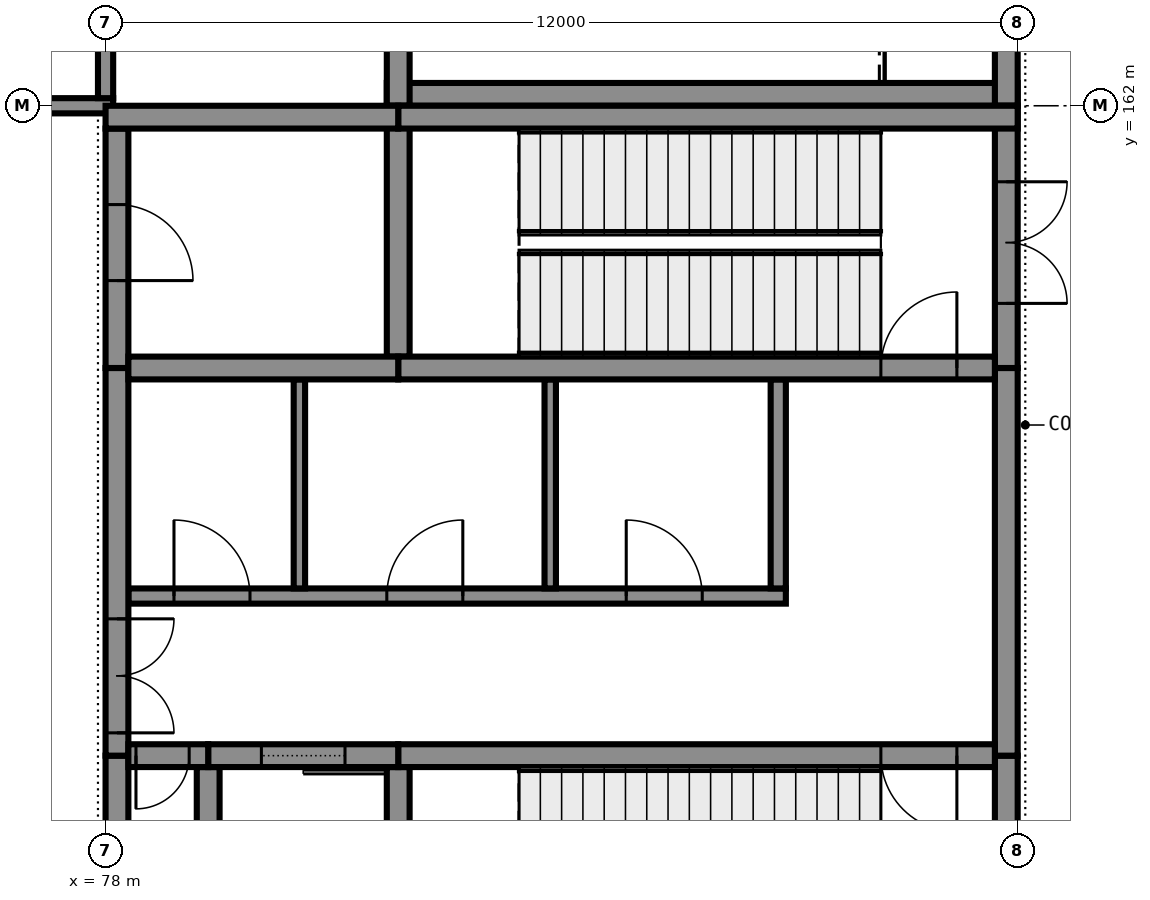
"""IFC4 building model, lengths in metres.
Left out: names, types, materials, properties, quantities, classifications, styles, units other than length and angle.
Written with IfcOpenShell. Run it as: python <this file> out.ifc"""

import sys

from ifc_helpers import new_model, si_unit, direction, frame, frame_2d, origin, place, context, subcontext, project, spatial, rectangle, extrude, element, fill, save


model = new_model("IFC4")
c1 = context("Model", 3, precision=1e-05, world=origin(), true_north=direction((0.0, 1.0)))
c2 = subcontext(c1, "Body", "Model", "MODEL_VIEW")
j1 = project(units=[si_unit("LENGTHUNIT", "METRE"), si_unit("PLANEANGLEUNIT", "RADIAN")], contexts=[c1])
p1 = place(None, origin())
s1 = spatial("IfcSite", under=j1, at=p1, CompositionType="ELEMENT")
p2 = place(p1, origin())
s2 = spatial("IfcBuilding", under=s1, at=p2, CompositionType="ELEMENT")
p3 = place(p2, origin())
s3 = spatial("IfcBuildingStorey", under=s2, at=p3, CompositionType="ELEMENT", Elevation=0.0)
p4 = place(p3, frame((90.0, 162.15, 0.0), z_axis=(0.0, 0.0, 1.0), x_axis=(-1.0, 0.0, 0.0)))
e1 = element("IfcWall", 1, at=p4, inside=s3, PredefinedType="SHEAR", context=c2, shape_type="SweptSolid", body=[
    extrude(rectangle(XDim=8.3, YDim=0.3, at=frame_2d((4.15, 0.0))), origin(), (0.0, 0.0, 1.0), 5.75),
])
p5 = place(p3, frame((89.85, 162.0, 0.0), z_axis=(0.0, 0.0, 1.0), x_axis=(0.0, 1.0, 0.0)))
e2 = element("IfcWall", 2, at=p5, inside=s3, PredefinedType="SHEAR", context=c2, shape_type="SweptSolid", body=[
    extrude(rectangle(XDim=3.3, YDim=0.3, at=frame_2d((1.65, 0.0))), origin(), (0.0, 0.0, 1.0), 5.75),
])
p6 = place(p5, frame((1.0, 0.0, 0.0)))
e3 = element("IfcOpeningElement", 3, at=p6, cuts=e2, PredefinedType="OPENING", context=c2, shape_type="SweptSolid", body=[
    extrude(rectangle(XDim=1.6, YDim=2.1, at=frame_2d((0.8, 1.05))), frame((0.0, 0.16, 0.0), z_axis=(0.0, -1.0, 0.0), x_axis=(1.0, 0.0, 0.0)), (0.0, 0.0, 1.0), 0.32),
])
p7 = place(p3, frame((81.85, 162.0, 0.0), z_axis=(0.0, 0.0, 1.0), x_axis=(0.0, 1.0, 0.0)))
e4 = element("IfcWall", 4, at=p7, inside=s3, PredefinedType="SHEAR", context=c2, shape_type="SweptSolid", body=[
    extrude(rectangle(XDim=3.3, YDim=0.3, at=frame_2d((1.65, 0.0))), origin(), (0.0, 0.0, 1.0), 5.75),
])
p8 = place(p3, frame((90.0, 161.85, 0.0), z_axis=(0.0, 0.0, 1.0), x_axis=(-1.0, 0.0, 0.0)))
e5 = element("IfcWall", 5, at=p8, inside=s3, PredefinedType="SHEAR", context=c2, shape_type="SweptSolid", body=[
    extrude(rectangle(XDim=8.15, YDim=0.3, at=frame_2d((4.075, 0.0))), origin(), (0.0, 0.0, 1.0), 5.75),
])
p9 = place(p3, frame((81.85, 161.85, 0.0), z_axis=(0.0, 0.0, 1.0), x_axis=(-1.0, 0.0, 0.0)))
e6 = element("IfcWall", 6, at=p9, inside=s3, PredefinedType="SHEAR", context=c2, shape_type="SweptSolid", body=[
    extrude(rectangle(XDim=3.85, YDim=0.3, at=frame_2d((1.925, 0.0))), origin(), (0.0, 0.0, 1.0), 5.75),
])
p10 = place(p3, frame((89.7, 153.45, 0.0), z_axis=(0.0, 0.0, 1.0), x_axis=(-1.0, 0.0, 0.0)))
e7 = element("IfcWall", 7, at=p10, inside=s3, PredefinedType="SHEAR", context=c2, shape_type="SweptSolid", body=[
    extrude(rectangle(XDim=7.85, YDim=0.3, at=frame_2d((3.925, 0.0))), origin(), (0.0, 0.0, 1.0), 5.75),
])
p11 = place(p10, frame((0.5, 0.0, 0.0)))
e8 = element("IfcOpeningElement", 8, at=p11, cuts=e7, PredefinedType="OPENING", context=c2, shape_type="SweptSolid", body=[
    extrude(rectangle(XDim=1.0, YDim=2.1, at=frame_2d((0.5, 1.05))), frame((0.0, 0.16, 0.0), z_axis=(0.0, -1.0, 0.0), x_axis=(1.0, 0.0, 0.0)), (0.0, 0.0, 1.0), 0.32),
])
p12 = place(p3, frame((81.85, 153.45, 0.0), z_axis=(0.0, 0.0, 1.0), x_axis=(-1.0, 0.0, 0.0)))
e9 = element("IfcWall", 9, at=p12, inside=s3, PredefinedType="SHEAR", context=c2, shape_type="SweptSolid", body=[
    extrude(rectangle(XDim=2.5, YDim=0.3, at=frame_2d((1.25, 0.0))), origin(), (0.0, 0.0, 1.0), 5.75),
])
p13 = place(p12, frame((0.7, 0.0, 0.0)))
e10 = element("IfcOpeningElement", 10, at=p13, cuts=e9, PredefinedType="OPENING", context=c2, shape_type="SweptSolid", body=[
    extrude(rectangle(XDim=1.1, YDim=2.1, at=frame_2d((0.55, 1.05))), frame((0.0, 0.16, 0.0), z_axis=(0.0, -1.0, 0.0), x_axis=(1.0, 0.0, 0.0)), (0.0, 0.0, 1.0), 0.32),
])
p14 = place(p3, frame((79.35, 153.45, 0.0), z_axis=(0.0, 0.0, 1.0), x_axis=(-1.0, 0.0, 0.0)))
e11 = element("IfcWall", 11, at=p14, inside=s3, PredefinedType="SHEAR", context=c2, shape_type="SweptSolid", body=[
    extrude(rectangle(XDim=1.05, YDim=0.3, at=frame_2d((0.525, 0.0))), origin(), (0.0, 0.0, 1.0), 5.75),
])
p15 = place(p14, frame((0.25, 0.0, 0.0)))
e12 = element("IfcOpeningElement", 12, at=p15, cuts=e11, PredefinedType="OPENING", context=c2, shape_type="SweptSolid", body=[
    extrude(rectangle(XDim=0.7, YDim=2.1, at=frame_2d((0.35, 1.05))), frame((0.0, 0.16, 0.0), z_axis=(0.0, -1.0, 0.0), x_axis=(1.0, 0.0, 0.0)), (0.0, 0.0, 1.0), 0.32),
])
p16 = place(p3, frame((89.7, 158.55, 0.0), z_axis=(0.0, 0.0, 1.0), x_axis=(-1.0, 0.0, 0.0)))
e13 = element("IfcWall", 13, at=p16, inside=s3, PredefinedType="SHEAR", context=c2, shape_type="SweptSolid", body=[
    extrude(rectangle(XDim=7.85, YDim=0.3, at=frame_2d((3.925, 0.0))), origin(), (0.0, 0.0, 1.0), 5.75),
])
p17 = place(p16, frame((0.5, 0.0, 0.0)))
e14 = element("IfcOpeningElement", 14, at=p17, cuts=e13, PredefinedType="OPENING", context=c2, shape_type="SweptSolid", body=[
    extrude(rectangle(XDim=1.0, YDim=2.1, at=frame_2d((0.5, 1.05))), frame((0.0, 0.16, 0.0), z_axis=(0.0, -1.0, 0.0), x_axis=(1.0, 0.0, 0.0)), (0.0, 0.0, 1.0), 0.32),
])
p18 = place(p3, frame((81.85, 158.55, 0.0), z_axis=(0.0, 0.0, 1.0), x_axis=(-1.0, 0.0, 0.0)))
e15 = element("IfcWall", 15, at=p18, inside=s3, PredefinedType="SHEAR", context=c2, shape_type="SweptSolid", body=[
    extrude(rectangle(XDim=3.55, YDim=0.3, at=frame_2d((1.775, 0.0))), origin(), (0.0, 0.0, 1.0), 5.75),
])
p19 = place(p3, frame((89.85, 150.3, 0.0), z_axis=(0.0, 0.0, 1.0), x_axis=(0.0, 1.0, 0.0)))
e16 = element("IfcWall", 16, at=p19, inside=s3, PredefinedType="SHEAR", context=c2, shape_type="SweptSolid", body=[
    extrude(rectangle(XDim=3.15, YDim=0.3, at=frame_2d((1.575, 0.0))), origin(), (0.0, 0.0, 1.0), 5.75),
])
p20 = place(p19, frame((0.65, 0.0, 0.0)))
e17 = element("IfcOpeningElement", 17, at=p20, cuts=e16, PredefinedType="OPENING", context=c2, shape_type="SweptSolid", body=[
    extrude(rectangle(XDim=1.6, YDim=2.1, at=frame_2d((0.8, 1.05))), frame((0.0, 0.16, 0.0), z_axis=(0.0, -1.0, 0.0), x_axis=(1.0, 0.0, 0.0)), (0.0, 0.0, 1.0), 0.32),
])
p21 = place(p3, frame((89.85, 153.45, 0.0), z_axis=(0.0, 0.0, 1.0), x_axis=(0.0, 1.0, 0.0)))
e18 = element("IfcWall", 18, at=p21, inside=s3, PredefinedType="SHEAR", context=c2, shape_type="SweptSolid", body=[
    extrude(rectangle(XDim=5.1, YDim=0.3, at=frame_2d((2.55, 0.0))), origin(), (0.0, 0.0, 1.0), 5.75),
])
p22 = place(p3, frame((89.85, 158.55, 0.0), z_axis=(0.0, 0.0, 1.0), x_axis=(0.0, 1.0, 0.0)))
e19 = element("IfcWall", 19, at=p22, inside=s3, PredefinedType="SHEAR", context=c2, shape_type="SweptSolid", body=[
    extrude(rectangle(XDim=3.45, YDim=0.3, at=frame_2d((1.725, 0.0))), origin(), (0.0, 0.0, 1.0), 5.75),
])
p23 = place(p22, frame((0.85, 0.0, 0.0)))
e20 = element("IfcOpeningElement", 20, at=p23, cuts=e19, PredefinedType="OPENING", context=c2, shape_type="SweptSolid", body=[
    extrude(rectangle(XDim=1.6, YDim=2.1, at=frame_2d((0.8, 1.05))), frame((0.0, 0.16, 0.0), z_axis=(0.0, -1.0, 0.0), x_axis=(1.0, 0.0, 0.0)), (0.0, 0.0, 1.0), 0.32),
])
p24 = place(p3, frame((78.15, 150.3, 0.0), z_axis=(0.0, 0.0, 1.0), x_axis=(0.0, 1.0, 0.0)))
e21 = element("IfcWall", 21, at=p24, inside=s3, PredefinedType="SHEAR", context=c2, shape_type="SweptSolid", body=[
    extrude(rectangle(XDim=3.15, YDim=0.3, at=frame_2d((1.575, 0.0))), origin(), (0.0, 0.0, 1.0), 5.75),
])
p25 = place(p3, frame((78.15, 153.45, 0.0), z_axis=(0.0, 0.0, 1.0), x_axis=(0.0, 1.0, 0.0)))
e22 = element("IfcWall", 22, at=p25, inside=s3, PredefinedType="SHEAR", context=c2, shape_type="SweptSolid", body=[
    extrude(rectangle(XDim=5.1, YDim=0.3, at=frame_2d((2.55, 0.0))), origin(), (0.0, 0.0, 1.0), 5.75),
])
p26 = place(p25, frame((0.3, 0.0, 0.0)))
e23 = element("IfcOpeningElement", 23, at=p26, cuts=e22, PredefinedType="OPENING", context=c2, shape_type="SweptSolid", body=[
    extrude(rectangle(XDim=1.5, YDim=2.1, at=frame_2d((0.75, 1.05))), frame((0.0, 0.16, 0.0), z_axis=(0.0, -1.0, 0.0), x_axis=(1.0, 0.0, 0.0)), (0.0, 0.0, 1.0), 0.32),
])
p27 = place(p3, frame((78.15, 158.55, 0.0), z_axis=(0.0, 0.0, 1.0), x_axis=(0.0, 1.0, 0.0)))
e24 = element("IfcWall", 24, at=p27, inside=s3, PredefinedType="SHEAR", context=c2, shape_type="SweptSolid", body=[
    extrude(rectangle(XDim=3.15, YDim=0.3, at=frame_2d((1.575, 0.0))), origin(), (0.0, 0.0, 1.0), 5.75),
])
p28 = place(p27, frame((1.15, 0.0, 0.0)))
e25 = element("IfcOpeningElement", 25, at=p28, cuts=e24, PredefinedType="OPENING", context=c2, shape_type="SweptSolid", body=[
    extrude(rectangle(XDim=1.0, YDim=2.1, at=frame_2d((0.5, 1.05))), frame((0.0, 0.16, 0.0), z_axis=(0.0, -1.0, 0.0), x_axis=(1.0, 0.0, 0.0)), (0.0, 0.0, 1.0), 0.32),
])
p29 = place(p3, frame((81.85, 150.3, 0.0), z_axis=(0.0, 0.0, 1.0), x_axis=(0.0, 1.0, 0.0)))
e26 = element("IfcWall", 26, at=p29, inside=s3, PredefinedType="SHEAR", context=c2, shape_type="SweptSolid", body=[
    extrude(rectangle(XDim=3.0, YDim=0.3, at=frame_2d((1.5, 0.0))), origin(), (0.0, 0.0, 1.0), 5.75),
])
p30 = place(p3, frame((81.85, 158.7, 0.0), z_axis=(0.0, 0.0, 1.0), x_axis=(0.0, 1.0, 0.0)))
e27 = element("IfcWall", 27, at=p30, inside=s3, PredefinedType="SHEAR", context=c2, shape_type="SweptSolid", body=[
    extrude(rectangle(XDim=3.3, YDim=0.3, at=frame_2d((1.65, 0.0))), origin(), (0.0, 0.0, 1.0), 5.75),
])
p31 = place(p3, frame((79.35, 150.3, 0.0), z_axis=(0.0, 0.0, 1.0), x_axis=(0.0, 1.0, 0.0)))
e28 = element("IfcWall", 28, at=p31, inside=s3, PredefinedType="SHEAR", context=c2, shape_type="SweptSolid", body=[
    extrude(rectangle(XDim=3.0, YDim=0.3, at=frame_2d((1.5, 0.0))), origin(), (0.0, 0.0, 1.0), 5.75),
])
p32 = place(p3, frame((78.3, 155.55, 0.0), z_axis=(0.0, 0.0, 1.0), x_axis=(1.0, 0.0, 0.0)))
e29 = element("IfcWall", 29, at=p32, inside=s3, PredefinedType="PARTITIONING", context=c2, shape_type="SweptSolid", body=[
    extrude(rectangle(XDim=8.65, YDim=0.2, at=frame_2d((4.325, 0.0))), origin(), (0.0, 0.0, 1.0), 5.75),
])
p33 = place(p32, frame((0.6, 0.0, 0.0)))
e30 = element("IfcOpeningElement", 30, at=p33, cuts=e29, PredefinedType="OPENING", context=c2, shape_type="SweptSolid", body=[
    extrude(rectangle(XDim=1.0, YDim=2.1, at=frame_2d((0.5, 1.05))), frame((0.0, 0.11, 0.0), z_axis=(0.0, -1.0, 0.0), x_axis=(1.0, 0.0, 0.0)), (0.0, 0.0, 1.0), 0.22),
])
p34 = place(p32, frame((3.4, 0.0, 0.0)))
e31 = element("IfcOpeningElement", 31, at=p34, cuts=e29, PredefinedType="OPENING", context=c2, shape_type="SweptSolid", body=[
    extrude(rectangle(XDim=1.0, YDim=2.1, at=frame_2d((0.5, 1.05))), frame((0.0, 0.11, 0.0), z_axis=(0.0, -1.0, 0.0), x_axis=(1.0, 0.0, 0.0)), (0.0, 0.0, 1.0), 0.22),
])
p35 = place(p32, frame((6.55, 0.0, 0.0)))
e32 = element("IfcOpeningElement", 32, at=p35, cuts=e29, PredefinedType="OPENING", context=c2, shape_type="SweptSolid", body=[
    extrude(rectangle(XDim=1.0, YDim=2.1, at=frame_2d((0.5, 1.05))), frame((0.0, 0.11, 0.0), z_axis=(0.0, -1.0, 0.0), x_axis=(1.0, 0.0, 0.0)), (0.0, 0.0, 1.0), 0.22),
])
p36 = place(p3, frame((29.9, 162.0, 0.0), z_axis=(0.0, 0.0, 1.0), x_axis=(1.0, 0.0, 0.0)))
e33 = element("IfcWall", 33, at=p36, inside=s3, PredefinedType="PARTITIONING", context=c2, shape_type="SweptSolid", body=[
    extrude(rectangle(XDim=48.2, YDim=0.2, at=frame_2d((24.1, 0.0))), origin(), (0.0, 0.0, 1.0), 4.75),
])
p37 = place(p36, frame((4.9, 0.0, 0.0)))
e34 = element("IfcOpeningElement", 34, at=p37, cuts=e33, PredefinedType="OPENING", context=c2, shape_type="SweptSolid", body=[
    extrude(rectangle(XDim=2.4, YDim=2.4, at=frame_2d((1.2, 1.2))), frame((0.0, 0.11, 0.0), z_axis=(0.0, -1.0, 0.0), x_axis=(1.0, 0.0, 0.0)), (0.0, 0.0, 1.0), 0.22),
])
p38 = place(p36, frame((16.9, 0.0, 0.0)))
e35 = element("IfcOpeningElement", 35, at=p38, cuts=e33, PredefinedType="OPENING", context=c2, shape_type="SweptSolid", body=[
    extrude(rectangle(XDim=2.4, YDim=2.4, at=frame_2d((1.2, 1.2))), frame((0.0, 0.11, 0.0), z_axis=(0.0, -1.0, 0.0), x_axis=(1.0, 0.0, 0.0)), (0.0, 0.0, 1.0), 0.22),
])
p39 = place(p36, frame((28.9, 0.0, 0.0)))
e36 = element("IfcOpeningElement", 36, at=p39, cuts=e33, PredefinedType="OPENING", context=c2, shape_type="SweptSolid", body=[
    extrude(rectangle(XDim=2.4, YDim=2.4, at=frame_2d((1.2, 1.2))), frame((0.0, 0.11, 0.0), z_axis=(0.0, -1.0, 0.0), x_axis=(1.0, 0.0, 0.0)), (0.0, 0.0, 1.0), 0.22),
])
p40 = place(p36, frame((40.9, 0.0, 0.0)))
e37 = element("IfcOpeningElement", 37, at=p40, cuts=e33, PredefinedType="OPENING", context=c2, shape_type="SweptSolid", body=[
    extrude(rectangle(XDim=2.4, YDim=2.4, at=frame_2d((1.2, 1.2))), frame((0.0, 0.11, 0.0), z_axis=(0.0, -1.0, 0.0), x_axis=(1.0, 0.0, 0.0)), (0.0, 0.0, 1.0), 0.22),
])
p41 = place(p3, frame((78.0, 162.1, 0.0), z_axis=(0.0, 0.0, 1.0), x_axis=(0.0, 1.0, 0.0)))
e38 = element("IfcWall", 38, at=p41, inside=s3, PredefinedType="PARTITIONING", context=c2, shape_type="SweptSolid", body=[
    extrude(rectangle(XDim=5.8, YDim=0.2, at=frame_2d((2.9, 0.0))), origin(), (0.0, 0.0, 1.0), 4.75),
])
for number, where, z_axis, x_axis in (
    (39, (80.55, 155.65, 0.0), (0.0, 0.0, 1.0), (0.0, 1.0, 0.0)),
    (40, (83.85, 155.65, 0.0), (0.0, 0.0, 1.0), (0.0, 1.0, 0.0)),
):
    element("IfcWall", number, at=place(p3, frame(where, z_axis=z_axis, x_axis=x_axis)), inside=s3, PredefinedType="PARTITIONING", context=c2, shape_type="SweptSolid", body=[
        extrude(rectangle(XDim=2.75, YDim=0.15, at=frame_2d((1.375, 0.0))), origin(), (0.0, 0.0, 1.0), 5.75),
    ])
p42 = place(p3, frame((86.85, 155.65, 0.0), z_axis=(0.0, 0.0, 1.0), x_axis=(0.0, 1.0, 0.0)))
e41 = element("IfcWall", 41, at=p42, inside=s3, PredefinedType="PARTITIONING", context=c2, shape_type="SweptSolid", body=[
    extrude(rectangle(XDim=2.75, YDim=0.2, at=frame_2d((1.375, 0.0))), origin(), (0.0, 0.0, 1.0), 5.75),
])
p43 = place(p15, origin())
e42 = element("IfcDoor", 42, at=p43, inside=s3, OperationType="SINGLE_SWING_LEFT", PredefinedType="DOOR", context=c2, shape_type="SweptSolid", body=[
    extrude(rectangle(XDim=0.7, YDim=2.1, at=frame_2d((0.35, 1.05))), frame((0.0, 0.025, 0.0), z_axis=(0.0, -1.0, 0.0), x_axis=(1.0, 0.0, 0.0)), (0.0, 0.0, 1.0), 0.05),
])
fill(e12, e42)
p44 = place(p13, origin())
e43 = element("IfcDoor", 43, at=p44, inside=s3, OperationType="SLIDING_TO_LEFT", PredefinedType="DOOR", context=c2, shape_type="SweptSolid", body=[
    extrude(rectangle(XDim=1.1, YDim=2.1, at=frame_2d((0.55, 1.05))), frame((0.0, 0.025, 0.0), z_axis=(0.0, -1.0, 0.0), x_axis=(1.0, 0.0, 0.0)), (0.0, 0.0, 1.0), 0.05),
])
fill(e10, e43)
p45 = place(p11, origin())
e44 = element("IfcDoor", 44, at=p45, inside=s3, OperationType="SINGLE_SWING_RIGHT", PredefinedType="DOOR", context=c2, shape_type="SweptSolid", body=[
    extrude(rectangle(XDim=1.0, YDim=2.1, at=frame_2d((0.5, 1.05))), frame((0.0, 0.025, 0.0), z_axis=(0.0, -1.0, 0.0), x_axis=(1.0, 0.0, 0.0)), (0.0, 0.0, 1.0), 0.05),
])
fill(e8, e44)
p46 = place(p26, frame((1.5, 0.0, 0.0), z_axis=(0.0, 0.0, 1.0), x_axis=(-1.0, 0.0, 0.0)))
e45 = element("IfcDoor", 45, at=p46, inside=s3, OperationType="DOUBLE_DOOR_SINGLE_SWING", PredefinedType="DOOR", context=c2, shape_type="SweptSolid", body=[
    extrude(rectangle(XDim=1.5, YDim=2.1, at=frame_2d((0.75, 1.05))), frame((0.0, 0.025, 0.0), z_axis=(0.0, -1.0, 0.0), x_axis=(1.0, 0.0, 0.0)), (0.0, 0.0, 1.0), 0.05),
])
fill(e23, e45)
p47 = place(p33, origin())
e46 = element("IfcDoor", 46, at=p47, inside=s3, OperationType="SINGLE_SWING_RIGHT", PredefinedType="DOOR", context=c2, shape_type="SweptSolid", body=[
    extrude(rectangle(XDim=1.0, YDim=2.1, at=frame_2d((0.5, 1.05))), frame((0.0, 0.025, 0.0), z_axis=(0.0, -1.0, 0.0), x_axis=(1.0, 0.0, 0.0)), (0.0, 0.0, 1.0), 0.05),
])
fill(e30, e46)
p48 = place(p34, origin())
e47 = element("IfcDoor", 47, at=p48, inside=s3, OperationType="SINGLE_SWING_LEFT", PredefinedType="DOOR", context=c2, shape_type="SweptSolid", body=[
    extrude(rectangle(XDim=1.0, YDim=2.1, at=frame_2d((0.5, 1.05))), frame((0.0, 0.025, 0.0), z_axis=(0.0, -1.0, 0.0), x_axis=(1.0, 0.0, 0.0)), (0.0, 0.0, 1.0), 0.05),
])
fill(e31, e47)
p49 = place(p35, origin())
e48 = element("IfcDoor", 48, at=p49, inside=s3, OperationType="SINGLE_SWING_RIGHT", PredefinedType="DOOR", context=c2, shape_type="SweptSolid", body=[
    extrude(rectangle(XDim=1.0, YDim=2.1, at=frame_2d((0.5, 1.05))), frame((0.0, 0.025, 0.0), z_axis=(0.0, -1.0, 0.0), x_axis=(1.0, 0.0, 0.0)), (0.0, 0.0, 1.0), 0.05),
])
fill(e32, e48)
p50 = place(p17, frame((1.0, 0.0, 0.0), z_axis=(0.0, 0.0, 1.0), x_axis=(-1.0, 0.0, 0.0)))
e49 = element("IfcDoor", 49, at=p50, inside=s3, OperationType="SINGLE_SWING_LEFT", PredefinedType="DOOR", context=c2, shape_type="SweptSolid", body=[
    extrude(rectangle(XDim=1.0, YDim=2.1, at=frame_2d((0.5, 1.05))), frame((0.0, 0.025, 0.0), z_axis=(0.0, -1.0, 0.0), x_axis=(1.0, 0.0, 0.0)), (0.0, 0.0, 1.0), 0.05),
])
fill(e14, e49)
p51 = place(p28, frame((1.0, 0.0, 0.0), z_axis=(0.0, 0.0, 1.0), x_axis=(-1.0, 0.0, 0.0)))
e50 = element("IfcDoor", 50, at=p51, inside=s3, OperationType="SINGLE_SWING_LEFT", PredefinedType="DOOR", context=c2, shape_type="SweptSolid", body=[
    extrude(rectangle(XDim=1.0, YDim=2.1, at=frame_2d((0.5, 1.05))), frame((0.0, 0.025, 0.0), z_axis=(0.0, -1.0, 0.0), x_axis=(1.0, 0.0, 0.0)), (0.0, 0.0, 1.0), 0.05),
])
fill(e25, e50)
p52 = place(p23, frame((1.6, 0.0, 0.0), z_axis=(0.0, 0.0, 1.0), x_axis=(-1.0, 0.0, 0.0)))
e51 = element("IfcDoor", 51, at=p52, inside=s3, OperationType="DOUBLE_DOOR_SINGLE_SWING", PredefinedType="DOOR", context=c2, shape_type="SweptSolid", body=[
    extrude(rectangle(XDim=1.6, YDim=2.1, at=frame_2d((0.8, 1.05))), frame((0.0, 0.025, 0.0), z_axis=(0.0, -1.0, 0.0), x_axis=(1.0, 0.0, 0.0)), (0.0, 0.0, 1.0), 0.05),
])
fill(e20, e51)
save(model, sys.argv[1])
